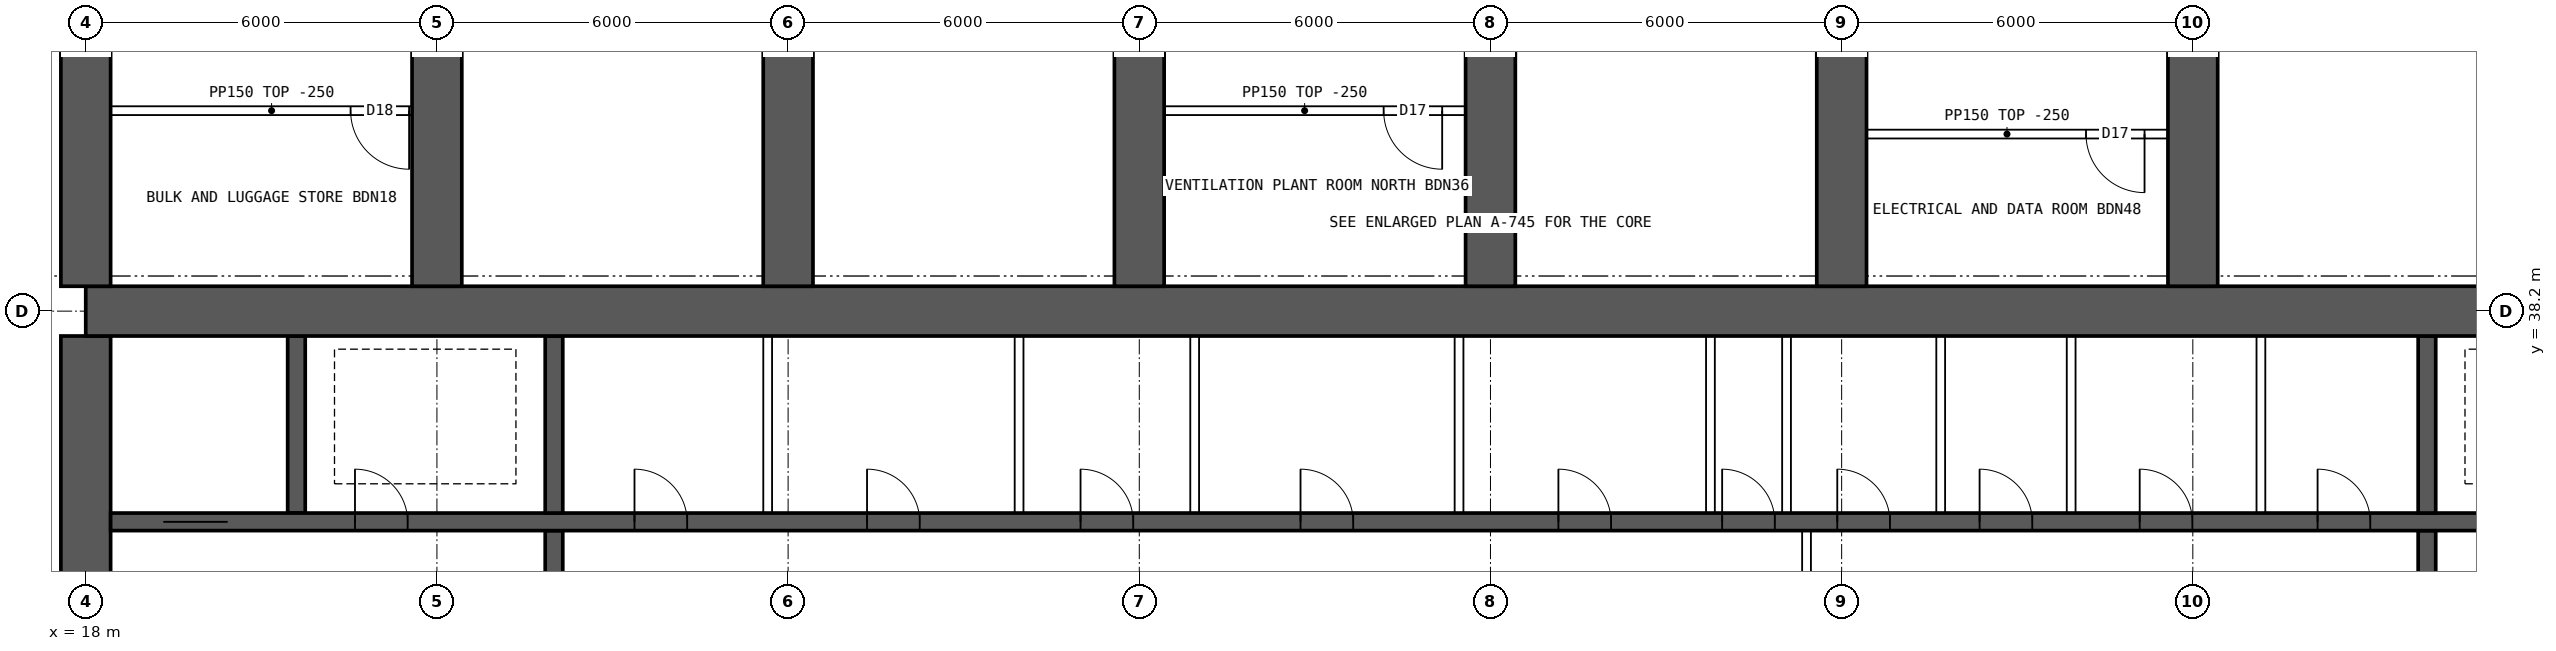
"""IFC4 building model, lengths in metres.
Left out: names, types, materials, properties, quantities, classifications, styles, units other than length and angle.
Written with IfcOpenShell. Run it as: python <this file> out.ifc"""

import sys

from ifc_helpers import new_model, si_unit, direction, frame, frame_2d, origin, place, context, subcontext, project, spatial, rectangle, extrude, element, fill, save


model = new_model("IFC4")
c1 = context("Model", 3, precision=1e-05, world=origin(), true_north=direction((0.0, 1.0)))
c2 = subcontext(c1, "Body", "Model", "MODEL_VIEW")
j1 = project(units=[si_unit("LENGTHUNIT", "METRE"), si_unit("PLANEANGLEUNIT", "RADIAN")], contexts=[c1])
p1 = place(None, origin())
s1 = spatial("IfcSite", under=j1, at=p1, CompositionType="ELEMENT")
p2 = place(p1, origin())
s2 = spatial("IfcBuilding", under=s1, at=p2, CompositionType="ELEMENT")
p3 = place(p2, frame((0.0, 0.0, 171.1)))
s3 = spatial("IfcBuildingStorey", under=s2, at=p3, CompositionType="ELEMENT", Elevation=171.1)
p4 = place(p3, frame((18.0, 38.2, 0.0), z_axis=(0.0, 0.0, 1.0), x_axis=(1.0, 0.0, 0.0)))
e1 = element("IfcWall", 1, at=p4, inside=s3, PredefinedType="SHEAR", context=c2, shape_type="SweptSolid", body=[
    extrude(rectangle(XDim=48.0, YDim=0.85, at=frame_2d((24.0, 0.0))), origin(), (0.0, 0.0, 1.0), 3.75),
])
p5 = place(p3, frame((18.0, 26.225, 0.0), z_axis=(0.0, 0.0, 1.0), x_axis=(0.0, 1.0, 0.0)))
e2 = element("IfcWall", 2, at=p5, inside=s3, PredefinedType="SHEAR", context=c2, shape_type="SweptSolid", body=[
    extrude(rectangle(XDim=11.55, YDim=0.85, at=frame_2d((5.775, 0.0))), origin(), (0.0, 0.0, 1.0), 3.75),
])
p6 = place(p5, frame((5.075, 0.0, 0.0)))
e3 = element("IfcOpeningElement", 3, at=p6, cuts=e2, PredefinedType="OPENING", context=c2, shape_type="SweptSolid", body=[
    extrude(rectangle(XDim=1.2, YDim=2.1, at=frame_2d((0.6, 1.05))), frame((0.0, 0.435, 0.0), z_axis=(0.0, -1.0, 0.0), x_axis=(1.0, 0.0, 0.0)), (0.0, 0.0, 1.0), 0.87),
])
p7 = place(p3, frame((18.425, 34.6, 0.0), z_axis=(0.0, 0.0, 1.0), x_axis=(1.0, 0.0, 0.0)))
e4 = element("IfcWall", 4, at=p7, inside=s3, PredefinedType="SHEAR", context=c2, shape_type="SweptSolid", body=[
    extrude(rectangle(XDim=47.15, YDim=0.3, at=frame_2d((23.575, 0.0))), origin(), (0.0, 0.0, 1.0), 3.75),
])
p8 = place(p7, frame((0.9, 0.0, 0.0)))
e5 = element("IfcOpeningElement", 5, at=p8, cuts=e4, PredefinedType="OPENING", context=c2, shape_type="SweptSolid", body=[
    extrude(rectangle(XDim=1.1, YDim=2.1, at=frame_2d((0.55, 1.05))), frame((0.0, 0.16, 0.0), z_axis=(0.0, -1.0, 0.0), x_axis=(1.0, 0.0, 0.0)), (0.0, 0.0, 1.0), 0.32),
])
p9 = place(p7, frame((45.15, 0.0, 0.0)))
e6 = element("IfcOpeningElement", 6, at=p9, cuts=e4, PredefinedType="OPENING", context=c2, shape_type="SweptSolid", body=[
    extrude(rectangle(XDim=1.1, YDim=2.1, at=frame_2d((0.55, 1.05))), frame((0.0, 0.16, 0.0), z_axis=(0.0, -1.0, 0.0), x_axis=(1.0, 0.0, 0.0)), (0.0, 0.0, 1.0), 0.32),
])
p10 = place(p7, frame((4.175, 0.0, 0.0)))
e7 = element("IfcOpeningElement", 7, at=p10, cuts=e4, PredefinedType="OPENING", context=c2, shape_type="SweptSolid", body=[
    extrude(rectangle(XDim=0.9, YDim=2.1, at=frame_2d((0.45, 1.05))), frame((0.0, 0.16, 0.0), z_axis=(0.0, -1.0, 0.0), x_axis=(1.0, 0.0, 0.0)), (0.0, 0.0, 1.0), 0.32),
])
p11 = place(p7, frame((42.075, 0.0, 0.0)))
e8 = element("IfcOpeningElement", 8, at=p11, cuts=e4, PredefinedType="OPENING", context=c2, shape_type="SweptSolid", body=[
    extrude(rectangle(XDim=0.9, YDim=2.1, at=frame_2d((0.45, 1.05))), frame((0.0, 0.16, 0.0), z_axis=(0.0, -1.0, 0.0), x_axis=(1.0, 0.0, 0.0)), (0.0, 0.0, 1.0), 0.32),
])
p12 = place(p7, frame((8.95, 0.0, 0.0)))
e9 = element("IfcOpeningElement", 9, at=p12, cuts=e4, PredefinedType="OPENING", context=c2, shape_type="SweptSolid", body=[
    extrude(rectangle(XDim=0.9, YDim=2.1, at=frame_2d((0.45, 1.05))), frame((0.0, 0.16, 0.0), z_axis=(0.0, -1.0, 0.0), x_axis=(1.0, 0.0, 0.0)), (0.0, 0.0, 1.0), 0.32),
])
p13 = place(p7, frame((12.924, 0.0, 0.0)))
e10 = element("IfcOpeningElement", 10, at=p13, cuts=e4, PredefinedType="OPENING", context=c2, shape_type="SweptSolid", body=[
    extrude(rectangle(XDim=0.9, YDim=2.1, at=frame_2d((0.45, 1.05))), frame((0.0, 0.16, 0.0), z_axis=(0.0, -1.0, 0.0), x_axis=(1.0, 0.0, 0.0)), (0.0, 0.0, 1.0), 0.32),
])
p14 = place(p7, frame((16.571, 0.0, 0.0)))
e11 = element("IfcOpeningElement", 11, at=p14, cuts=e4, PredefinedType="OPENING", context=c2, shape_type="SweptSolid", body=[
    extrude(rectangle(XDim=0.9, YDim=2.1, at=frame_2d((0.45, 1.05))), frame((0.0, 0.16, 0.0), z_axis=(0.0, -1.0, 0.0), x_axis=(1.0, 0.0, 0.0)), (0.0, 0.0, 1.0), 0.32),
])
p15 = place(p7, frame((20.33, 0.0, 0.0)))
e12 = element("IfcOpeningElement", 12, at=p15, cuts=e4, PredefinedType="OPENING", context=c2, shape_type="SweptSolid", body=[
    extrude(rectangle(XDim=0.9, YDim=2.1, at=frame_2d((0.45, 1.05))), frame((0.0, 0.16, 0.0), z_axis=(0.0, -1.0, 0.0), x_axis=(1.0, 0.0, 0.0)), (0.0, 0.0, 1.0), 0.32),
])
p16 = place(p7, frame((24.736, 0.0, 0.0)))
e13 = element("IfcOpeningElement", 13, at=p16, cuts=e4, PredefinedType="OPENING", context=c2, shape_type="SweptSolid", body=[
    extrude(rectangle(XDim=0.9, YDim=2.1, at=frame_2d((0.45, 1.05))), frame((0.0, 0.16, 0.0), z_axis=(0.0, -1.0, 0.0), x_axis=(1.0, 0.0, 0.0)), (0.0, 0.0, 1.0), 0.32),
])
p17 = place(p7, frame((27.533, 0.0, 0.0)))
e14 = element("IfcOpeningElement", 14, at=p17, cuts=e4, PredefinedType="OPENING", context=c2, shape_type="SweptSolid", body=[
    extrude(rectangle(XDim=0.9, YDim=2.1, at=frame_2d((0.45, 1.05))), frame((0.0, 0.16, 0.0), z_axis=(0.0, -1.0, 0.0), x_axis=(1.0, 0.0, 0.0)), (0.0, 0.0, 1.0), 0.32),
])
p18 = place(p7, frame((29.5, 0.0, 0.0)))
e15 = element("IfcOpeningElement", 15, at=p18, cuts=e4, PredefinedType="OPENING", context=c2, shape_type="SweptSolid", body=[
    extrude(rectangle(XDim=0.9, YDim=2.1, at=frame_2d((0.45, 1.05))), frame((0.0, 0.16, 0.0), z_axis=(0.0, -1.0, 0.0), x_axis=(1.0, 0.0, 0.0)), (0.0, 0.0, 1.0), 0.32),
])
p19 = place(p7, frame((31.932, 0.0, 0.0)))
e16 = element("IfcOpeningElement", 16, at=p19, cuts=e4, PredefinedType="OPENING", context=c2, shape_type="SweptSolid", body=[
    extrude(rectangle(XDim=0.9, YDim=2.1, at=frame_2d((0.45, 1.05))), frame((0.0, 0.16, 0.0), z_axis=(0.0, -1.0, 0.0), x_axis=(1.0, 0.0, 0.0)), (0.0, 0.0, 1.0), 0.32),
])
p20 = place(p7, frame((34.667, 0.0, 0.0)))
e17 = element("IfcOpeningElement", 17, at=p20, cuts=e4, PredefinedType="OPENING", context=c2, shape_type="SweptSolid", body=[
    extrude(rectangle(XDim=0.9, YDim=2.1, at=frame_2d((0.45, 1.05))), frame((0.0, 0.16, 0.0), z_axis=(0.0, -1.0, 0.0), x_axis=(1.0, 0.0, 0.0)), (0.0, 0.0, 1.0), 0.32),
])
p21 = place(p7, frame((37.707, 0.0, 0.0)))
e18 = element("IfcOpeningElement", 18, at=p21, cuts=e4, PredefinedType="OPENING", context=c2, shape_type="SweptSolid", body=[
    extrude(rectangle(XDim=0.9, YDim=2.1, at=frame_2d((0.45, 1.05))), frame((0.0, 0.16, 0.0), z_axis=(0.0, -1.0, 0.0), x_axis=(1.0, 0.0, 0.0)), (0.0, 0.0, 1.0), 0.32),
])
p22 = place(p3, frame((26.0, 30.55, 0.0), z_axis=(0.0, 0.0, 1.0), x_axis=(0.0, 1.0, 0.0)))
e19 = element("IfcWall", 19, at=p22, inside=s3, PredefinedType="SHEAR", context=c2, shape_type="SweptSolid", body=[
    extrude(rectangle(XDim=3.9, YDim=0.3, at=frame_2d((1.95, 0.0))), origin(), (0.0, 0.0, 1.0), 3.75),
])
p23 = place(p22, frame((1.4, 0.0, 0.0)))
e20 = element("IfcOpeningElement", 20, at=p23, cuts=e19, PredefinedType="OPENING", context=c2, shape_type="SweptSolid", body=[
    extrude(rectangle(XDim=1.2, YDim=2.1, at=frame_2d((0.6, 1.05))), frame((0.0, 0.16, 0.0), z_axis=(0.0, -1.0, 0.0), x_axis=(1.0, 0.0, 0.0)), (0.0, 0.0, 1.0), 0.32),
])
p24 = place(p3, frame((58.0, 30.55, 0.0), z_axis=(0.0, 0.0, 1.0), x_axis=(0.0, 1.0, 0.0)))
e21 = element("IfcWall", 21, at=p24, inside=s3, PredefinedType="SHEAR", context=c2, shape_type="SweptSolid", body=[
    extrude(rectangle(XDim=3.9, YDim=0.3, at=frame_2d((1.95, 0.0))), origin(), (0.0, 0.0, 1.0), 3.75),
])
p25 = place(p24, frame((1.4, 0.0, 0.0)))
e22 = element("IfcOpeningElement", 22, at=p25, cuts=e21, PredefinedType="OPENING", context=c2, shape_type="SweptSolid", body=[
    extrude(rectangle(XDim=1.2, YDim=2.1, at=frame_2d((0.6, 1.05))), frame((0.0, 0.16, 0.0), z_axis=(0.0, -1.0, 0.0), x_axis=(1.0, 0.0, 0.0)), (0.0, 0.0, 1.0), 0.32),
])
for number, where, z_axis, x_axis in (
    (23, (21.6, 34.75, 0.0), (0.0, 0.0, 1.0), (0.0, 1.0, 0.0)),
    (24, (26.0, 34.75, 0.0), (0.0, 0.0, 1.0), (0.0, 1.0, 0.0)),
    (25, (58.0, 34.75, 0.0), (0.0, 0.0, 1.0), (0.0, 1.0, 0.0)),
):
    element("IfcWall", number, at=place(p3, frame(where, z_axis=z_axis, x_axis=x_axis)), inside=s3, PredefinedType="SHEAR", context=c2, shape_type="SweptSolid", body=[
        extrude(rectangle(XDim=3.025, YDim=0.3, at=frame_2d((1.512, 0.0))), origin(), (0.0, 0.0, 1.0), 3.75),
    ])
for number, where, z_axis, x_axis in (
    (26, (18.0, 38.625, 0.0), (0.0, 0.0, 1.0), (0.0, 1.0, 0.0)),
    (27, (24.0, 38.625, 0.0), (0.0, 0.0, 1.0), (0.0, 1.0, 0.0)),
    (28, (30.0, 38.625, 0.0), (0.0, 0.0, 1.0), (0.0, 1.0, 0.0)),
    (29, (36.0, 38.625, 0.0), (0.0, 0.0, 1.0), (0.0, 1.0, 0.0)),
    (30, (42.0, 38.625, 0.0), (0.0, 0.0, 1.0), (0.0, 1.0, 0.0)),
    (31, (48.0, 38.625, 0.0), (0.0, 0.0, 1.0), (0.0, 1.0, 0.0)),
    (32, (54.0, 38.625, 0.0), (0.0, 0.0, 1.0), (0.0, 1.0, 0.0)),
):
    element("IfcWall", number, at=place(p3, frame(where, z_axis=z_axis, x_axis=x_axis)), inside=s3, PredefinedType="SHEAR", context=c2, shape_type="SweptSolid", body=[
        extrude(rectangle(XDim=8.175, YDim=0.85, at=frame_2d((4.087, 0.0))), origin(), (0.0, 0.0, 1.0), 3.75),
    ])
p26 = place(p3, frame((47.4, 30.55, 0.0), z_axis=(0.0, 0.0, 1.0), x_axis=(0.0, 1.0, 0.0)))
e33 = element("IfcWall", 33, at=p26, inside=s3, PredefinedType="SOLIDWALL", context=c2, shape_type="SweptSolid", body=[
    extrude(rectangle(XDim=3.9, YDim=0.15, at=frame_2d((1.95, 0.0))), origin(), (0.0, 0.0, 1.0), 3.5),
])
p27 = place(p26, frame((1.15, 0.0, 0.0)))
e34 = element("IfcOpeningElement", 34, at=p27, cuts=e33, PredefinedType="OPENING", context=c2, shape_type="SweptSolid", body=[
    extrude(rectangle(XDim=1.6, YDim=2.1, at=frame_2d((0.8, 1.05))), frame((0.0, 0.085, 0.0), z_axis=(0.0, -1.0, 0.0), x_axis=(1.0, 0.0, 0.0)), (0.0, 0.0, 1.0), 0.17),
])
for number, where, z_axis, x_axis in (
    (35, (29.651, 34.75, 0.0), (0.0, 0.0, 1.0), (0.0, 1.0, 0.0)),
    (36, (33.946, 34.75, 0.0), (0.0, 0.0, 1.0), (0.0, 1.0, 0.0)),
    (37, (36.946, 34.75, 0.0), (0.0, 0.0, 1.0), (0.0, 1.0, 0.0)),
    (38, (41.463, 34.75, 0.0), (0.0, 0.0, 1.0), (0.0, 1.0, 0.0)),
    (39, (45.758, 34.75, 0.0), (0.0, 0.0, 1.0), (0.0, 1.0, 0.0)),
    (40, (47.058, 34.75, 0.0), (0.0, 0.0, 1.0), (0.0, 1.0, 0.0)),
    (41, (49.692, 34.75, 0.0), (0.0, 0.0, 1.0), (0.0, 1.0, 0.0)),
    (42, (51.921, 34.75, 0.0), (0.0, 0.0, 1.0), (0.0, 1.0, 0.0)),
    (43, (55.163, 34.75, 0.0), (0.0, 0.0, 1.0), (0.0, 1.0, 0.0)),
):
    element("IfcWall", number, at=place(p3, frame(where, z_axis=z_axis, x_axis=x_axis)), inside=s3, PredefinedType="SOLIDWALL", context=c2, shape_type="SweptSolid", body=[
        extrude(rectangle(XDim=3.025, YDim=0.15, at=frame_2d((1.512, 0.0))), origin(), (0.0, 0.0, 1.0), 3.5),
    ])
p28 = place(p3, frame((23.925, 41.625, 0.0), z_axis=(0.0, 0.0, 1.0), x_axis=(-1.0, 0.0, 0.0)))
e44 = element("IfcWall", 44, at=p28, inside=s3, PredefinedType="PARTITIONING", context=c2, shape_type="SweptSolid", body=[
    extrude(rectangle(XDim=5.5, YDim=0.15, at=frame_2d((2.75, 0.0))), origin(), (0.0, 0.0, 1.0), 3.5),
])
p29 = place(p28, frame((0.4, 0.0, 0.0)))
e45 = element("IfcOpeningElement", 45, at=p29, cuts=e44, PredefinedType="OPENING", context=c2, shape_type="SweptSolid", body=[
    extrude(rectangle(XDim=1.0, YDim=2.1, at=frame_2d((0.5, 1.05))), frame((0.0, 0.085, 0.0), z_axis=(0.0, -1.0, 0.0), x_axis=(1.0, 0.0, 0.0)), (0.0, 0.0, 1.0), 0.17),
])
p30 = place(p3, frame((41.575, 41.625, 0.0), z_axis=(0.0, 0.0, 1.0), x_axis=(-1.0, 0.0, 0.0)))
e46 = element("IfcWall", 46, at=p30, inside=s3, PredefinedType="PARTITIONING", context=c2, shape_type="SweptSolid", body=[
    extrude(rectangle(XDim=5.5, YDim=0.15, at=frame_2d((2.75, 0.0))), origin(), (0.0, 0.0, 1.0), 3.5),
])
p31 = place(p30, frame((0.4, 0.0, 0.0)))
e47 = element("IfcOpeningElement", 47, at=p31, cuts=e46, PredefinedType="OPENING", context=c2, shape_type="SweptSolid", body=[
    extrude(rectangle(XDim=1.0, YDim=2.1, at=frame_2d((0.5, 1.05))), frame((0.0, 0.085, 0.0), z_axis=(0.0, -1.0, 0.0), x_axis=(1.0, 0.0, 0.0)), (0.0, 0.0, 1.0), 0.17),
])
p32 = place(p3, frame((53.575, 41.225, 0.0), z_axis=(0.0, 0.0, 1.0), x_axis=(-1.0, 0.0, 0.0)))
e48 = element("IfcWall", 48, at=p32, inside=s3, PredefinedType="PARTITIONING", context=c2, shape_type="SweptSolid", body=[
    extrude(rectangle(XDim=5.5, YDim=0.15, at=frame_2d((2.75, 0.0))), origin(), (0.0, 0.0, 1.0), 3.5),
])
p33 = place(p32, frame((0.4, 0.0, 0.0)))
e49 = element("IfcOpeningElement", 49, at=p33, cuts=e48, PredefinedType="OPENING", context=c2, shape_type="SweptSolid", body=[
    extrude(rectangle(XDim=1.0, YDim=2.1, at=frame_2d((0.5, 1.05))), frame((0.0, 0.085, 0.0), z_axis=(0.0, -1.0, 0.0), x_axis=(1.0, 0.0, 0.0)), (0.0, 0.0, 1.0), 0.17),
])
p34 = place(p8, origin())
e50 = element("IfcDoor", 50, at=p34, inside=s3, OperationType="DOUBLE_DOOR_SLIDING", PredefinedType="DOOR", context=c2, shape_type="SweptSolid", body=[
    extrude(rectangle(XDim=1.1, YDim=2.1, at=frame_2d((0.55, 1.05))), frame((0.0, 0.025, 0.0), z_axis=(0.0, -1.0, 0.0), x_axis=(1.0, 0.0, 0.0)), (0.0, 0.0, 1.0), 0.05),
])
fill(e5, e50)
p35 = place(p10, origin())
e51 = element("IfcDoor", 51, at=p35, inside=s3, OperationType="SINGLE_SWING_LEFT", PredefinedType="DOOR", context=c2, shape_type="SweptSolid", body=[
    extrude(rectangle(XDim=0.9, YDim=2.1, at=frame_2d((0.45, 1.05))), frame((0.0, 0.025, 0.0), z_axis=(0.0, -1.0, 0.0), x_axis=(1.0, 0.0, 0.0)), (0.0, 0.0, 1.0), 0.05),
])
fill(e7, e51)
p36 = place(p12, origin())
e52 = element("IfcDoor", 52, at=p36, inside=s3, OperationType="SINGLE_SWING_LEFT", PredefinedType="DOOR", context=c2, shape_type="SweptSolid", body=[
    extrude(rectangle(XDim=0.9, YDim=2.1, at=frame_2d((0.45, 1.05))), frame((0.0, 0.025, 0.0), z_axis=(0.0, -1.0, 0.0), x_axis=(1.0, 0.0, 0.0)), (0.0, 0.0, 1.0), 0.05),
])
fill(e9, e52)
p37 = place(p13, origin())
e53 = element("IfcDoor", 53, at=p37, inside=s3, OperationType="SINGLE_SWING_LEFT", PredefinedType="DOOR", context=c2, shape_type="SweptSolid", body=[
    extrude(rectangle(XDim=0.9, YDim=2.1, at=frame_2d((0.45, 1.05))), frame((0.0, 0.025, 0.0), z_axis=(0.0, -1.0, 0.0), x_axis=(1.0, 0.0, 0.0)), (0.0, 0.0, 1.0), 0.05),
])
fill(e10, e53)
p38 = place(p14, origin())
e54 = element("IfcDoor", 54, at=p38, inside=s3, OperationType="SINGLE_SWING_LEFT", PredefinedType="DOOR", context=c2, shape_type="SweptSolid", body=[
    extrude(rectangle(XDim=0.9, YDim=2.1, at=frame_2d((0.45, 1.05))), frame((0.0, 0.025, 0.0), z_axis=(0.0, -1.0, 0.0), x_axis=(1.0, 0.0, 0.0)), (0.0, 0.0, 1.0), 0.05),
])
fill(e11, e54)
p39 = place(p15, origin())
e55 = element("IfcDoor", 55, at=p39, inside=s3, OperationType="SINGLE_SWING_LEFT", PredefinedType="DOOR", context=c2, shape_type="SweptSolid", body=[
    extrude(rectangle(XDim=0.9, YDim=2.1, at=frame_2d((0.45, 1.05))), frame((0.0, 0.025, 0.0), z_axis=(0.0, -1.0, 0.0), x_axis=(1.0, 0.0, 0.0)), (0.0, 0.0, 1.0), 0.05),
])
fill(e12, e55)
p40 = place(p16, origin())
e56 = element("IfcDoor", 56, at=p40, inside=s3, OperationType="SINGLE_SWING_LEFT", PredefinedType="DOOR", context=c2, shape_type="SweptSolid", body=[
    extrude(rectangle(XDim=0.9, YDim=2.1, at=frame_2d((0.45, 1.05))), frame((0.0, 0.025, 0.0), z_axis=(0.0, -1.0, 0.0), x_axis=(1.0, 0.0, 0.0)), (0.0, 0.0, 1.0), 0.05),
])
fill(e13, e56)
p41 = place(p17, origin())
e57 = element("IfcDoor", 57, at=p41, inside=s3, OperationType="SINGLE_SWING_LEFT", PredefinedType="DOOR", context=c2, shape_type="SweptSolid", body=[
    extrude(rectangle(XDim=0.9, YDim=2.1, at=frame_2d((0.45, 1.05))), frame((0.0, 0.025, 0.0), z_axis=(0.0, -1.0, 0.0), x_axis=(1.0, 0.0, 0.0)), (0.0, 0.0, 1.0), 0.05),
])
fill(e14, e57)
p42 = place(p18, origin())
e58 = element("IfcDoor", 58, at=p42, inside=s3, OperationType="SINGLE_SWING_LEFT", PredefinedType="DOOR", context=c2, shape_type="SweptSolid", body=[
    extrude(rectangle(XDim=0.9, YDim=2.1, at=frame_2d((0.45, 1.05))), frame((0.0, 0.025, 0.0), z_axis=(0.0, -1.0, 0.0), x_axis=(1.0, 0.0, 0.0)), (0.0, 0.0, 1.0), 0.05),
])
fill(e15, e58)
p43 = place(p19, origin())
e59 = element("IfcDoor", 59, at=p43, inside=s3, OperationType="SINGLE_SWING_LEFT", PredefinedType="DOOR", context=c2, shape_type="SweptSolid", body=[
    extrude(rectangle(XDim=0.9, YDim=2.1, at=frame_2d((0.45, 1.05))), frame((0.0, 0.025, 0.0), z_axis=(0.0, -1.0, 0.0), x_axis=(1.0, 0.0, 0.0)), (0.0, 0.0, 1.0), 0.05),
])
fill(e16, e59)
p44 = place(p20, origin())
e60 = element("IfcDoor", 60, at=p44, inside=s3, OperationType="SINGLE_SWING_LEFT", PredefinedType="DOOR", context=c2, shape_type="SweptSolid", body=[
    extrude(rectangle(XDim=0.9, YDim=2.1, at=frame_2d((0.45, 1.05))), frame((0.0, 0.025, 0.0), z_axis=(0.0, -1.0, 0.0), x_axis=(1.0, 0.0, 0.0)), (0.0, 0.0, 1.0), 0.05),
])
fill(e17, e60)
p45 = place(p21, origin())
e61 = element("IfcDoor", 61, at=p45, inside=s3, OperationType="SINGLE_SWING_LEFT", PredefinedType="DOOR", context=c2, shape_type="SweptSolid", body=[
    extrude(rectangle(XDim=0.9, YDim=2.1, at=frame_2d((0.45, 1.05))), frame((0.0, 0.025, 0.0), z_axis=(0.0, -1.0, 0.0), x_axis=(1.0, 0.0, 0.0)), (0.0, 0.0, 1.0), 0.05),
])
fill(e18, e61)
p46 = place(p29, origin())
e62 = element("IfcDoor", 62, at=p46, inside=s3, OperationType="SINGLE_SWING_LEFT", PredefinedType="DOOR", context=c2, shape_type="SweptSolid", body=[
    extrude(rectangle(XDim=1.0, YDim=2.1, at=frame_2d((0.5, 1.05))), frame((0.0, 0.025, 0.0), z_axis=(0.0, -1.0, 0.0), x_axis=(1.0, 0.0, 0.0)), (0.0, 0.0, 1.0), 0.05),
])
fill(e45, e62)
p47 = place(p31, origin())
e63 = element("IfcDoor", 63, at=p47, inside=s3, OperationType="SINGLE_SWING_LEFT", PredefinedType="DOOR", context=c2, shape_type="SweptSolid", body=[
    extrude(rectangle(XDim=1.0, YDim=2.1, at=frame_2d((0.5, 1.05))), frame((0.0, 0.025, 0.0), z_axis=(0.0, -1.0, 0.0), x_axis=(1.0, 0.0, 0.0)), (0.0, 0.0, 1.0), 0.05),
])
fill(e47, e63)
p48 = place(p33, origin())
e64 = element("IfcDoor", 64, at=p48, inside=s3, OperationType="SINGLE_SWING_LEFT", PredefinedType="DOOR", context=c2, shape_type="SweptSolid", body=[
    extrude(rectangle(XDim=1.0, YDim=2.1, at=frame_2d((0.5, 1.05))), frame((0.0, 0.025, 0.0), z_axis=(0.0, -1.0, 0.0), x_axis=(1.0, 0.0, 0.0)), (0.0, 0.0, 1.0), 0.05),
])
fill(e49, e64)
save(model, sys.argv[1])
